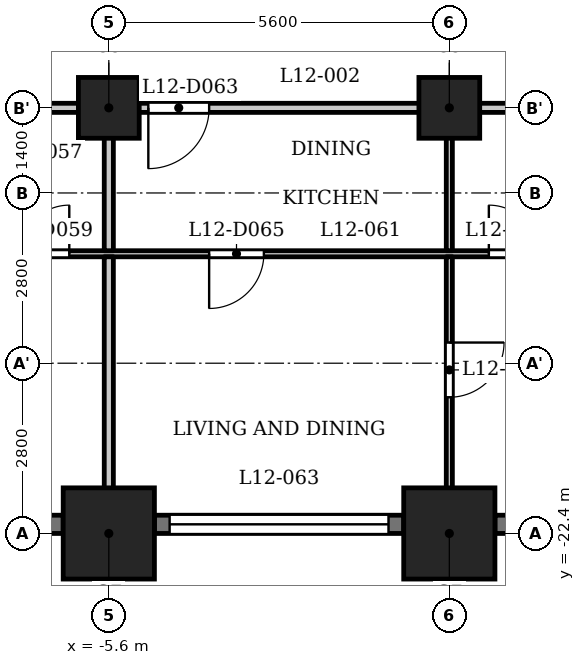
"""IFC4 building model, lengths in metres.
Left out: names, types, materials, properties, quantities, classifications, styles, units other than length and angle.
Written with IfcOpenShell. Run it as: python <this file> out.ifc"""

import sys

from ifc_helpers import new_model, si_unit, direction, frame, frame_2d, origin, origin_2d, place, context, subcontext, project, spatial, rectangle, extrude, element, fill, save


model = new_model("IFC4")
c1 = context("Model", 3, precision=1e-05, world=origin(), true_north=direction((0.0, 1.0)))
c2 = subcontext(c1, "Body", "Model", "MODEL_VIEW")
j1 = project(units=[si_unit("LENGTHUNIT", "METRE"), si_unit("PLANEANGLEUNIT", "RADIAN")], contexts=[c1])
p1 = place(None, origin())
s1 = spatial("IfcSite", under=j1, at=p1, CompositionType="ELEMENT")
p2 = place(p1, origin())
s2 = spatial("IfcBuilding", under=s1, at=p2, CompositionType="ELEMENT")
p3 = place(p2, frame((0.0, 0.0, 51.5)))
s3 = spatial("IfcBuildingStorey", under=s2, at=p3, CompositionType="ELEMENT", Elevation=51.5)
for number, where, z_axis, x_axis in (
    (1, (-5.6, -22.4, 0.0), (0.0, 0.0, 1.0), (1.0, 0.0, 0.0)),
    (2, (0.0, -22.4, 0.0), (0.0, 0.0, 1.0), (1.0, 0.0, 0.0)),
):
    element("IfcColumn", number, at=place(p3, frame(where, z_axis=z_axis, x_axis=x_axis)), inside=s3, PredefinedType="COLUMN", context=c2, shape_type="SweptSolid", body=[
        extrude(rectangle(XDim=1.5, YDim=1.5, at=origin_2d()), origin(), (0.0, 0.0, 1.0), 3.5),
    ])
for number, where, z_axis, x_axis in (
    (3, (-5.6, -15.4, 0.0), (0.0, 0.0, 1.0), (1.0, 0.0, 0.0)),
    (4, (0.0, -15.4, 0.0), (0.0, 0.0, 1.0), (1.0, 0.0, 0.0)),
):
    element("IfcColumn", number, at=place(p3, frame(where, z_axis=z_axis, x_axis=x_axis)), inside=s3, PredefinedType="COLUMN", context=c2, shape_type="SweptSolid", body=[
        extrude(rectangle(XDim=1.0, YDim=1.0, at=origin_2d()), origin(), (0.0, 0.0, 1.0), 3.5),
    ])
p4 = place(p3, frame((-10.45, -22.25, 0.0), z_axis=(0.0, 0.0, 1.0), x_axis=(1.0, 0.0, 0.0)))
e5 = element("IfcWall", 5, at=p4, inside=s3, PredefinedType="SOLIDWALL", context=c2, shape_type="SweptSolid", body=[
    extrude(rectangle(XDim=4.1, YDim=0.3, at=frame_2d((2.05, 0.0))), origin(), (0.0, 0.0, 1.0), 2.35),
])
p5 = place(p4, frame((0.25, 0.0, 1.2)))
e6 = element("IfcOpeningElement", 6, at=p5, cuts=e5, PredefinedType="OPENING", context=c2, shape_type="SweptSolid", body=[
    extrude(rectangle(XDim=3.6, YDim=0.95, at=frame_2d((1.8, 0.475))), frame((0.0, 0.16, 0.0), z_axis=(0.0, -1.0, 0.0), x_axis=(1.0, 0.0, 0.0)), (0.0, 0.0, 1.0), 0.32),
])
p6 = place(p3, frame((-4.85, -22.25, 0.0), z_axis=(0.0, 0.0, 1.0), x_axis=(1.0, 0.0, 0.0)))
e7 = element("IfcWall", 7, at=p6, inside=s3, PredefinedType="SOLIDWALL", context=c2, shape_type="SweptSolid", body=[
    extrude(rectangle(XDim=4.1, YDim=0.3, at=frame_2d((2.05, 0.0))), origin(), (0.0, 0.0, 1.0), 2.35),
])
p7 = place(p6, frame((0.25, 0.0, 1.2)))
e8 = element("IfcOpeningElement", 8, at=p7, cuts=e7, PredefinedType="OPENING", context=c2, shape_type="SweptSolid", body=[
    extrude(rectangle(XDim=3.6, YDim=0.95, at=frame_2d((1.8, 0.475))), frame((0.0, 0.16, 0.0), z_axis=(0.0, -1.0, 0.0), x_axis=(1.0, 0.0, 0.0)), (0.0, 0.0, 1.0), 0.32),
])
p8 = place(p3, frame((0.75, -22.25, 0.0), z_axis=(0.0, 0.0, 1.0), x_axis=(1.0, 0.0, 0.0)))
e9 = element("IfcWall", 9, at=p8, inside=s3, PredefinedType="SOLIDWALL", context=c2, shape_type="SweptSolid", body=[
    extrude(rectangle(XDim=4.1, YDim=0.3, at=frame_2d((2.05, 0.0))), origin(), (0.0, 0.0, 1.0), 2.35),
])
p9 = place(p8, frame((0.25, 0.0, 1.2)))
e10 = element("IfcOpeningElement", 10, at=p9, cuts=e9, PredefinedType="OPENING", context=c2, shape_type="SweptSolid", body=[
    extrude(rectangle(XDim=3.6, YDim=0.95, at=frame_2d((1.8, 0.475))), frame((0.0, 0.16, 0.0), z_axis=(0.0, -1.0, 0.0), x_axis=(1.0, 0.0, 0.0)), (0.0, 0.0, 1.0), 0.32),
])
p10 = place(p3, frame((-26.394, -17.8, 0.0), z_axis=(0.0, 0.0, 1.0), x_axis=(1.0, 0.0, 0.0)))
e11 = element("IfcWall", 11, at=p10, inside=s3, PredefinedType="PARTITIONING", context=c2, shape_type="SweptSolid", body=[
    extrude(rectangle(XDim=53.126, YDim=0.1, at=frame_2d((26.563, 0.0))), origin(), (0.0, 0.0, 1.0), 3.2),
])
p11 = place(p10, frame((0.794, 0.0, 0.0)))
e12 = element("IfcOpeningElement", 12, at=p11, cuts=e11, PredefinedType="OPENING", context=c2, shape_type="SweptSolid", body=[
    extrude(rectangle(XDim=0.8, YDim=2.1, at=frame_2d((0.4, 1.05))), frame((0.0, 0.06, 0.0), z_axis=(0.0, -1.0, 0.0), x_axis=(1.0, 0.0, 0.0)), (0.0, 0.0, 1.0), 0.12),
])
p12 = place(p10, frame((5.644, 0.0, 0.0)))
e13 = element("IfcOpeningElement", 13, at=p12, cuts=e11, PredefinedType="OPENING", context=c2, shape_type="SweptSolid", body=[
    extrude(rectangle(XDim=0.9, YDim=2.1, at=frame_2d((0.45, 1.05))), frame((0.0, 0.06, 0.0), z_axis=(0.0, -1.0, 0.0), x_axis=(1.0, 0.0, 0.0)), (0.0, 0.0, 1.0), 0.12),
])
p13 = place(p10, frame((19.344, 0.0, 0.0)))
e14 = element("IfcOpeningElement", 14, at=p13, cuts=e11, PredefinedType="OPENING", context=c2, shape_type="SweptSolid", body=[
    extrude(rectangle(XDim=0.8, YDim=2.1, at=frame_2d((0.4, 1.05))), frame((0.0, 0.06, 0.0), z_axis=(0.0, -1.0, 0.0), x_axis=(1.0, 0.0, 0.0)), (0.0, 0.0, 1.0), 0.12),
])
p14 = place(p10, frame((17.094, 0.0, 0.0)))
e15 = element("IfcOpeningElement", 15, at=p14, cuts=e11, PredefinedType="OPENING", context=c2, shape_type="SweptSolid", body=[
    extrude(rectangle(XDim=0.9, YDim=2.1, at=frame_2d((0.45, 1.05))), frame((0.0, 0.06, 0.0), z_axis=(0.0, -1.0, 0.0), x_axis=(1.0, 0.0, 0.0)), (0.0, 0.0, 1.0), 0.12),
])
p15 = place(p10, frame((10.494, 0.0, 0.0)))
e16 = element("IfcOpeningElement", 16, at=p15, cuts=e11, PredefinedType="OPENING", context=c2, shape_type="SweptSolid", body=[
    extrude(rectangle(XDim=0.9, YDim=2.1, at=frame_2d((0.45, 1.05))), frame((0.0, 0.06, 0.0), z_axis=(0.0, -1.0, 0.0), x_axis=(1.0, 0.0, 0.0)), (0.0, 0.0, 1.0), 0.12),
])
p16 = place(p10, frame((13.294, 0.0, 0.0)))
e17 = element("IfcOpeningElement", 17, at=p16, cuts=e11, PredefinedType="OPENING", context=c2, shape_type="SweptSolid", body=[
    extrude(rectangle(XDim=0.9, YDim=2.1, at=frame_2d((0.45, 1.05))), frame((0.0, 0.06, 0.0), z_axis=(0.0, -1.0, 0.0), x_axis=(1.0, 0.0, 0.0)), (0.0, 0.0, 1.0), 0.12),
])
p17 = place(p10, frame((27.044, 0.0, 0.0)))
e18 = element("IfcOpeningElement", 18, at=p17, cuts=e11, PredefinedType="OPENING", context=c2, shape_type="SweptSolid", body=[
    extrude(rectangle(XDim=0.8, YDim=2.1, at=frame_2d((0.4, 1.05))), frame((0.0, 0.06, 0.0), z_axis=(0.0, -1.0, 0.0), x_axis=(1.0, 0.0, 0.0)), (0.0, 0.0, 1.0), 0.12),
])
p18 = place(p10, frame((22.444, 0.0, 0.0)))
e19 = element("IfcOpeningElement", 19, at=p18, cuts=e11, PredefinedType="OPENING", context=c2, shape_type="SweptSolid", body=[
    extrude(rectangle(XDim=0.9, YDim=2.1, at=frame_2d((0.45, 1.05))), frame((0.0, 0.06, 0.0), z_axis=(0.0, -1.0, 0.0), x_axis=(1.0, 0.0, 0.0)), (0.0, 0.0, 1.0), 0.12),
])
p19 = place(p10, frame((36.144, 0.0, 0.0)))
e20 = element("IfcOpeningElement", 20, at=p19, cuts=e11, PredefinedType="OPENING", context=c2, shape_type="SweptSolid", body=[
    extrude(rectangle(XDim=0.8, YDim=2.1, at=frame_2d((0.4, 1.05))), frame((0.0, 0.06, 0.0), z_axis=(0.0, -1.0, 0.0), x_axis=(1.0, 0.0, 0.0)), (0.0, 0.0, 1.0), 0.12),
])
p20 = place(p10, frame((33.644, 0.0, 0.0)))
e21 = element("IfcOpeningElement", 21, at=p20, cuts=e11, PredefinedType="OPENING", context=c2, shape_type="SweptSolid", body=[
    extrude(rectangle(XDim=0.9, YDim=2.1, at=frame_2d((0.45, 1.05))), frame((0.0, 0.06, 0.0), z_axis=(0.0, -1.0, 0.0), x_axis=(1.0, 0.0, 0.0)), (0.0, 0.0, 1.0), 0.12),
])
p21 = place(p10, frame((39.144, 0.0, 0.0)))
e22 = element("IfcOpeningElement", 22, at=p21, cuts=e11, PredefinedType="OPENING", context=c2, shape_type="SweptSolid", body=[
    extrude(rectangle(XDim=0.8, YDim=2.1, at=frame_2d((0.4, 1.05))), frame((0.0, 0.06, 0.0), z_axis=(0.0, -1.0, 0.0), x_axis=(1.0, 0.0, 0.0)), (0.0, 0.0, 1.0), 0.12),
])
p22 = place(p10, frame((41.494, 0.0, 0.0)))
e23 = element("IfcOpeningElement", 23, at=p22, cuts=e11, PredefinedType="OPENING", context=c2, shape_type="SweptSolid", body=[
    extrude(rectangle(XDim=0.9, YDim=2.1, at=frame_2d((0.45, 1.05))), frame((0.0, 0.06, 0.0), z_axis=(0.0, -1.0, 0.0), x_axis=(1.0, 0.0, 0.0)), (0.0, 0.0, 1.0), 0.12),
])
p23 = place(p10, frame((49.362, 0.0, 0.0)))
e24 = element("IfcOpeningElement", 24, at=p23, cuts=e11, PredefinedType="OPENING", context=c2, shape_type="SweptSolid", body=[
    extrude(rectangle(XDim=0.8, YDim=2.1, at=frame_2d((0.4, 1.05))), frame((0.0, 0.06, 0.0), z_axis=(0.0, -1.0, 0.0), x_axis=(1.0, 0.0, 0.0)), (0.0, 0.0, 1.0), 0.12),
])
p24 = place(p10, frame((45.094, 0.0, 0.0)))
e25 = element("IfcOpeningElement", 25, at=p24, cuts=e11, PredefinedType="OPENING", context=c2, shape_type="SweptSolid", body=[
    extrude(rectangle(XDim=0.9, YDim=2.1, at=frame_2d((0.45, 1.05))), frame((0.0, 0.06, 0.0), z_axis=(0.0, -1.0, 0.0), x_axis=(1.0, 0.0, 0.0)), (0.0, 0.0, 1.0), 0.12),
])
p25 = place(p3, frame((-27.484, -15.4, 0.0), z_axis=(0.0, 0.0, 1.0), x_axis=(1.0, 0.0, 0.0)))
e26 = element("IfcWall", 26, at=p25, inside=s3, PredefinedType="PARTITIONING", context=c2, shape_type="SweptSolid", body=[
    extrude(rectangle(XDim=54.968, YDim=0.15, at=frame_2d((27.484, 0.0))), origin(), (0.0, 0.0, 1.0), 3.2),
])
p26 = place(p25, frame((5.734, 0.0, 0.0)))
e27 = element("IfcOpeningElement", 27, at=p26, cuts=e26, PredefinedType="OPENING", context=c2, shape_type="SweptSolid", body=[
    extrude(rectangle(XDim=1.0, YDim=2.1, at=frame_2d((0.5, 1.05))), frame((0.0, 0.085, 0.0), z_axis=(0.0, -1.0, 0.0), x_axis=(1.0, 0.0, 0.0)), (0.0, 0.0, 1.0), 0.17),
])
p27 = place(p25, frame((11.584, 0.0, 0.0)))
e28 = element("IfcOpeningElement", 28, at=p27, cuts=e26, PredefinedType="OPENING", context=c2, shape_type="SweptSolid", body=[
    extrude(rectangle(XDim=1.0, YDim=2.1, at=frame_2d((0.5, 1.05))), frame((0.0, 0.085, 0.0), z_axis=(0.0, -1.0, 0.0), x_axis=(1.0, 0.0, 0.0)), (0.0, 0.0, 1.0), 0.17),
])
p28 = place(p25, frame((22.534, 0.0, 0.0)))
e29 = element("IfcOpeningElement", 29, at=p28, cuts=e26, PredefinedType="OPENING", context=c2, shape_type="SweptSolid", body=[
    extrude(rectangle(XDim=1.0, YDim=2.1, at=frame_2d((0.5, 1.05))), frame((0.0, 0.085, 0.0), z_axis=(0.0, -1.0, 0.0), x_axis=(1.0, 0.0, 0.0)), (0.0, 0.0, 1.0), 0.17),
])
p29 = place(p25, frame((33.734, 0.0, 0.0)))
e30 = element("IfcOpeningElement", 30, at=p29, cuts=e26, PredefinedType="OPENING", context=c2, shape_type="SweptSolid", body=[
    extrude(rectangle(XDim=1.0, YDim=2.1, at=frame_2d((0.5, 1.05))), frame((0.0, 0.085, 0.0), z_axis=(0.0, -1.0, 0.0), x_axis=(1.0, 0.0, 0.0)), (0.0, 0.0, 1.0), 0.17),
])
p30 = place(p25, frame((42.334, 0.0, 0.0)))
e31 = element("IfcOpeningElement", 31, at=p30, cuts=e26, PredefinedType="OPENING", context=c2, shape_type="SweptSolid", body=[
    extrude(rectangle(XDim=1.0, YDim=2.1, at=frame_2d((0.5, 1.05))), frame((0.0, 0.085, 0.0), z_axis=(0.0, -1.0, 0.0), x_axis=(1.0, 0.0, 0.0)), (0.0, 0.0, 1.0), 0.17),
])
p31 = place(p25, frame((45.184, 0.0, 0.0)))
e32 = element("IfcOpeningElement", 32, at=p31, cuts=e26, PredefinedType="OPENING", context=c2, shape_type="SweptSolid", body=[
    extrude(rectangle(XDim=1.0, YDim=2.1, at=frame_2d((0.5, 1.05))), frame((0.0, 0.085, 0.0), z_axis=(0.0, -1.0, 0.0), x_axis=(1.0, 0.0, 0.0)), (0.0, 0.0, 1.0), 0.17),
])
p32 = place(p3, frame((-5.6, -23.13, 0.0), z_axis=(0.0, 0.0, 1.0), x_axis=(0.0, 1.0, 0.0)))
e33 = element("IfcWall", 33, at=p32, inside=s3, PredefinedType="PARTITIONING", context=c2, shape_type="SweptSolid", body=[
    extrude(rectangle(XDim=5.28, YDim=0.15, at=frame_2d((2.64, 0.0))), origin(), (0.0, 0.0, 1.0), 3.2),
])
p33 = place(p3, frame((-5.6, -17.75, 0.0), z_axis=(0.0, 0.0, 1.0), x_axis=(0.0, 1.0, 0.0)))
e34 = element("IfcWall", 34, at=p33, inside=s3, PredefinedType="PARTITIONING", context=c2, shape_type="SweptSolid", body=[
    extrude(rectangle(XDim=2.275, YDim=0.15, at=frame_2d((1.137, 0.0))), origin(), (0.0, 0.0, 1.0), 3.2),
])
p34 = place(p3, frame((0.0, -23.13, 0.0), z_axis=(0.0, 0.0, 1.0), x_axis=(0.0, 1.0, 0.0)))
e35 = element("IfcWall", 35, at=p34, inside=s3, PredefinedType="PARTITIONING", context=c2, shape_type="SweptSolid", body=[
    extrude(rectangle(XDim=5.28, YDim=0.1, at=frame_2d((2.64, 0.0))), origin(), (0.0, 0.0, 1.0), 3.2),
])
p35 = place(p34, frame((2.97, 0.0, 0.0)))
e36 = element("IfcOpeningElement", 36, at=p35, cuts=e35, PredefinedType="OPENING", context=c2, shape_type="SweptSolid", body=[
    extrude(rectangle(XDim=0.9, YDim=2.1, at=frame_2d((0.45, 1.05))), frame((0.0, 0.06, 0.0), z_axis=(0.0, -1.0, 0.0), x_axis=(1.0, 0.0, 0.0)), (0.0, 0.0, 1.0), 0.12),
])
p36 = place(p3, frame((0.0, -17.75, 0.0), z_axis=(0.0, 0.0, 1.0), x_axis=(0.0, 1.0, 0.0)))
e37 = element("IfcWall", 37, at=p36, inside=s3, PredefinedType="PARTITIONING", context=c2, shape_type="SweptSolid", body=[
    extrude(rectangle(XDim=2.275, YDim=0.1, at=frame_2d((1.137, 0.0))), origin(), (0.0, 0.0, 1.0), 3.2),
])
p37 = place(p13, origin())
e38 = element("IfcDoor", 38, at=p37, inside=s3, OperationType="SINGLE_SWING_LEFT", PredefinedType="DOOR", context=c2, shape_type="SweptSolid", body=[
    extrude(rectangle(XDim=0.8, YDim=2.1, at=frame_2d((0.4, 1.05))), frame((0.0, 0.025, 0.0), z_axis=(0.0, -1.0, 0.0), x_axis=(1.0, 0.0, 0.0)), (0.0, 0.0, 1.0), 0.05),
])
fill(e14, e38)
p38 = place(p28, origin())
e39 = element("IfcDoor", 39, at=p38, inside=s3, OperationType="SINGLE_SWING_LEFT", PredefinedType="DOOR", context=c2, shape_type="SweptSolid", body=[
    extrude(rectangle(XDim=1.0, YDim=2.1, at=frame_2d((0.5, 1.05))), frame((0.0, 0.025, 0.0), z_axis=(0.0, -1.0, 0.0), x_axis=(1.0, 0.0, 0.0)), (0.0, 0.0, 1.0), 0.05),
])
fill(e29, e39)
p39 = place(p17, origin())
e40 = element("IfcDoor", 40, at=p39, inside=s3, OperationType="SINGLE_SWING_RIGHT", PredefinedType="DOOR", context=c2, shape_type="SweptSolid", body=[
    extrude(rectangle(XDim=0.8, YDim=2.1, at=frame_2d((0.4, 1.05))), frame((0.0, 0.025, 0.0), z_axis=(0.0, -1.0, 0.0), x_axis=(1.0, 0.0, 0.0)), (0.0, 0.0, 1.0), 0.05),
])
fill(e18, e40)
p40 = place(p18, origin())
e41 = element("IfcDoor", 41, at=p40, inside=s3, OperationType="SINGLE_SWING_LEFT", PredefinedType="DOOR", context=c2, shape_type="SweptSolid", body=[
    extrude(rectangle(XDim=0.9, YDim=2.1, at=frame_2d((0.45, 1.05))), frame((0.0, 0.025, 0.0), z_axis=(0.0, -1.0, 0.0), x_axis=(1.0, 0.0, 0.0)), (0.0, 0.0, 1.0), 0.05),
])
fill(e19, e41)
p41 = place(p35, origin())
e42 = element("IfcDoor", 42, at=p41, inside=s3, OperationType="SINGLE_SWING_RIGHT", PredefinedType="DOOR", context=c2, shape_type="SweptSolid", body=[
    extrude(rectangle(XDim=0.9, YDim=2.1, at=frame_2d((0.45, 1.05))), frame((0.0, 0.025, 0.0), z_axis=(0.0, -1.0, 0.0), x_axis=(1.0, 0.0, 0.0)), (0.0, 0.0, 1.0), 0.05),
])
fill(e36, e42)
p42 = place(p7, origin())
e43 = element("IfcWindow", 43, at=p42, inside=s3, PartitioningType="SINGLE_PANEL", PredefinedType="WINDOW", context=c2, shape_type="SweptSolid", body=[
    extrude(rectangle(XDim=3.6, YDim=0.95, at=frame_2d((1.8, 0.475))), frame((0.0, 0.03, 0.0), z_axis=(0.0, -1.0, 0.0), x_axis=(1.0, 0.0, 0.0)), (0.0, 0.0, 1.0), 0.06),
])
fill(e8, e43)
save(model, sys.argv[1])
